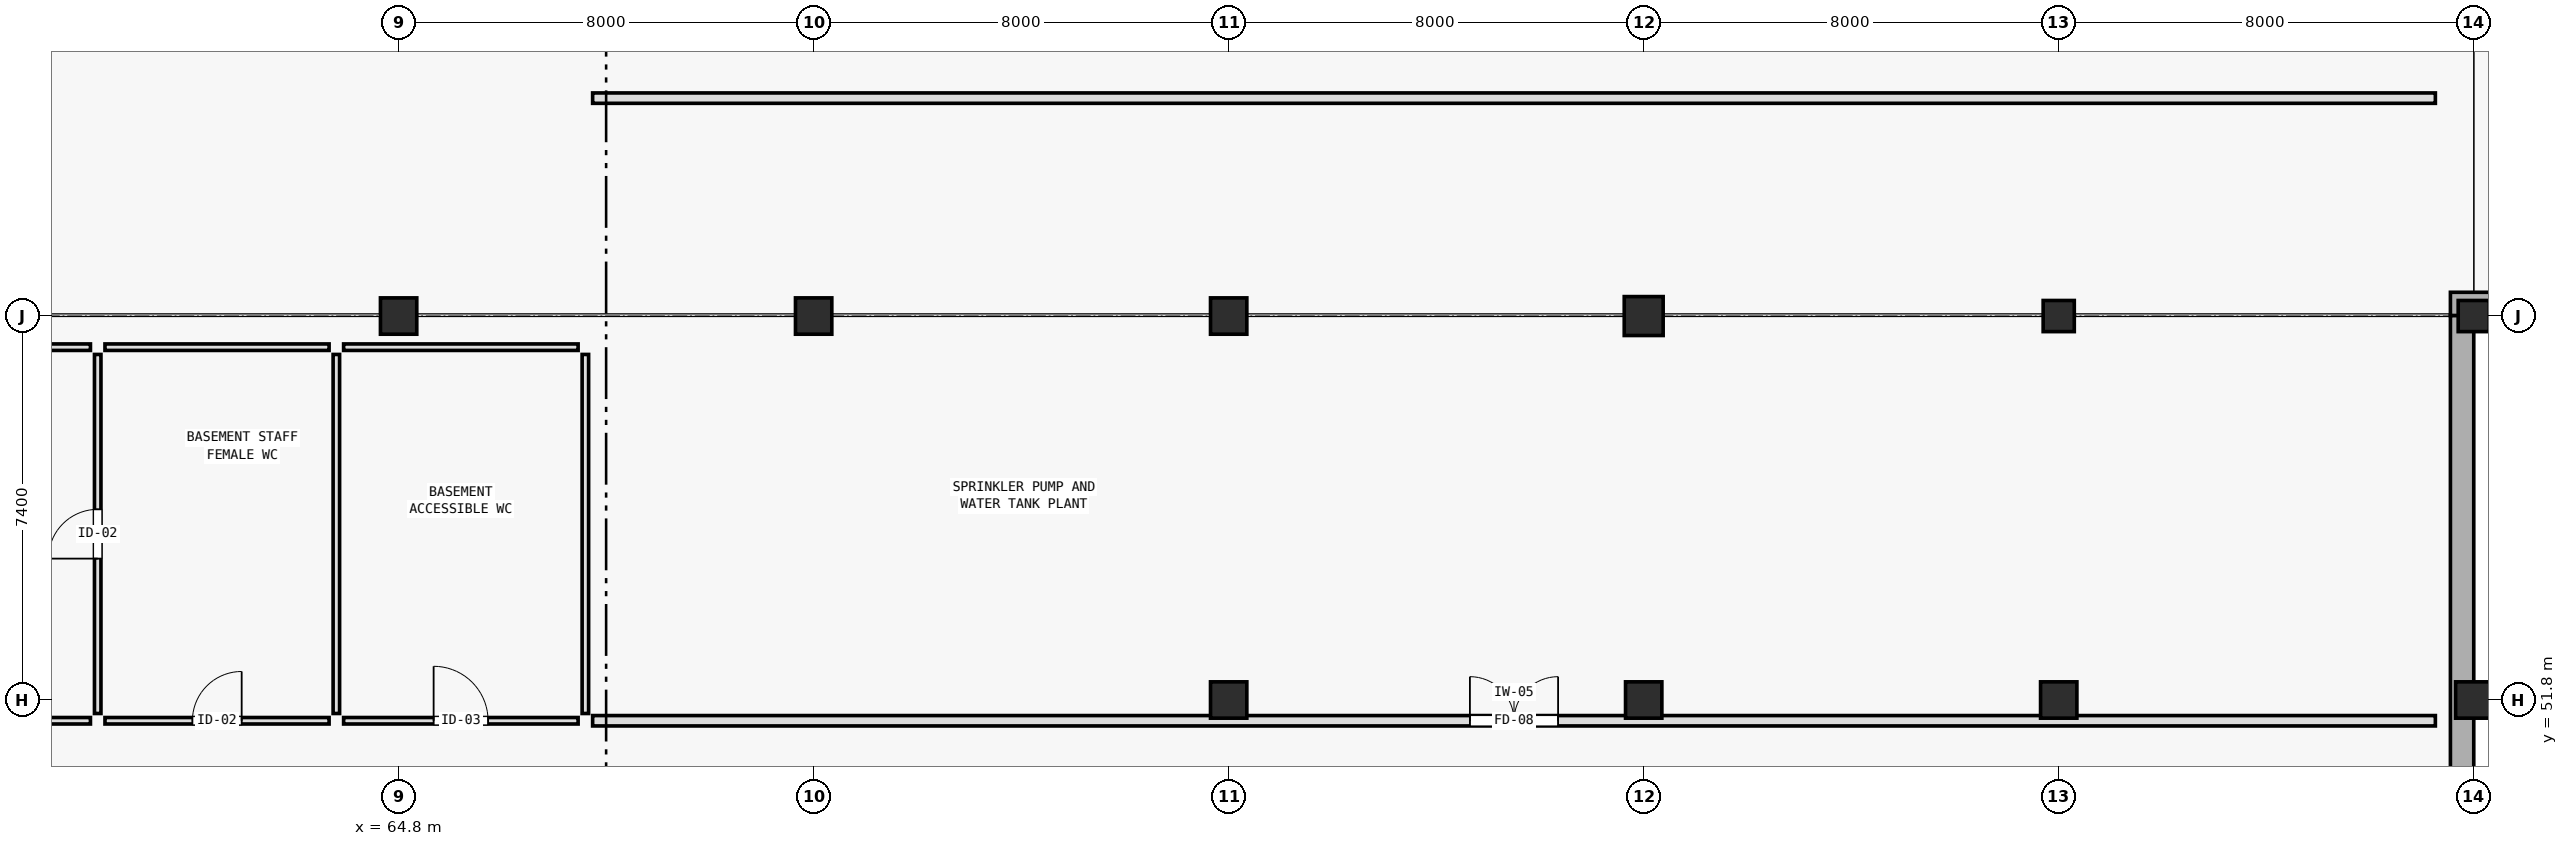
"""IFC4 building model, lengths in metres.
Left out: names, types, materials, properties, quantities, classifications, styles, units other than length and angle.
Written with IfcOpenShell. Run it as: python <this file> out.ifc"""

import sys

from ifc_helpers import new_model, si_unit, direction, frame, frame_2d, origin, origin_2d, place, context, subcontext, project, spatial, rectangle, circle, extrude, element, fill, save


model = new_model("IFC4")
c1 = context("Model", 3, precision=1e-05, world=origin(), true_north=direction((0.0, 1.0)))
c2 = subcontext(c1, "Body", "Model", "MODEL_VIEW")
j1 = project(units=[si_unit("LENGTHUNIT", "METRE"), si_unit("PLANEANGLEUNIT", "RADIAN")], contexts=[c1])
p1 = place(None, origin())
s1 = spatial("IfcSite", under=j1, at=p1, CompositionType="ELEMENT")
p2 = place(p1, origin())
s2 = spatial("IfcBuilding", under=s1, at=p2, CompositionType="ELEMENT")
p3 = place(p2, frame((0.0, 0.0, -4.8)))
s3 = spatial("IfcBuildingStorey", under=s2, at=p3, CompositionType="ELEMENT", Elevation=-4.8)
p4 = place(p3, frame((152.35, 59.433, 0.0), z_axis=(0.0, 0.0, 1.0), x_axis=(-1.0, 0.0, 0.0)))
e1 = element("IfcWall", 1, at=p4, inside=s3, PredefinedType="SOLIDWALL", context=c2, shape_type="SweptSolid", body=[
    extrude(rectangle(XDim=48.0, YDim=0.45, at=frame_2d((24.0, 0.0))), origin(), (0.0, 0.0, 1.0), 4.38),
])
p5 = place(p3, frame((104.575, 59.208, 0.0), z_axis=(0.0, 0.0, 1.0), x_axis=(0.0, -1.0, 0.0)))
e2 = element("IfcWall", 2, at=p5, inside=s3, PredefinedType="SOLIDWALL", context=c2, shape_type="SweptSolid", body=[
    extrude(rectangle(XDim=21.758, YDim=0.45, at=frame_2d((10.879, 0.0))), origin(), (0.0, 0.0, 1.0), 4.38),
])
for number, where, z_axis, x_axis in (
    (3, (64.8, 59.2, 0.0), (0.0, 0.0, 1.0), (1.0, 0.0, 0.0)),
    (4, (72.8, 59.2, 0.0), (0.0, 0.0, 1.0), (1.0, 0.0, 0.0)),
    (5, (80.8, 51.8, 0.0), (0.0, 0.0, 1.0), (1.0, 0.0, 0.0)),
    (6, (80.8, 59.2, 0.0), (0.0, 0.0, 1.0), (1.0, 0.0, 0.0)),
    (7, (88.8, 51.8, 0.0), (0.0, 0.0, 1.0), (1.0, 0.0, 0.0)),
):
    element("IfcColumn", number, at=place(p3, frame(where, z_axis=z_axis, x_axis=x_axis)), inside=s3, PredefinedType="COLUMN", context=c2, shape_type="SweptSolid", body=[
        extrude(circle(Radius=0.35, at=origin_2d()), origin(), (0.0, 0.0, 1.0), 4.8),
    ])
p6 = place(p3, frame((88.8, 59.2, 0.0), z_axis=(0.0, 0.0, 1.0), x_axis=(1.0, 0.0, 0.0)))
e8 = element("IfcColumn", 8, at=p6, inside=s3, PredefinedType="COLUMN", context=c2, shape_type="SweptSolid", body=[
    extrude(rectangle(XDim=0.75, YDim=0.75, at=origin_2d()), origin(), (0.0, 0.0, 1.0), 4.8),
])
p7 = place(p3, frame((96.8, 51.8, 0.0), z_axis=(0.0, 0.0, 1.0), x_axis=(1.0, 0.0, 0.0)))
e9 = element("IfcColumn", 9, at=p7, inside=s3, PredefinedType="COLUMN", context=c2, shape_type="SweptSolid", body=[
    extrude(circle(Radius=0.35, at=origin_2d()), origin(), (0.0, 0.0, 1.0), 4.8),
])
p8 = place(p3, frame((96.8, 59.2, 0.0), z_axis=(0.0, 0.0, 1.0), x_axis=(1.0, 0.0, 0.0)))
e10 = element("IfcColumn", 10, at=p8, inside=s3, PredefinedType="COLUMN", context=c2, shape_type="SweptSolid", body=[
    extrude(rectangle(XDim=0.6, YDim=0.6, at=origin_2d()), origin(), (0.0, 0.0, 1.0), 4.8),
])
p9 = place(p3, frame((104.8, 51.8, 0.0), z_axis=(0.0, 0.0, 1.0), x_axis=(1.0, 0.0, 0.0)))
e11 = element("IfcColumn", 11, at=p9, inside=s3, PredefinedType="COLUMN", context=c2, shape_type="SweptSolid", body=[
    extrude(circle(Radius=0.35, at=origin_2d()), origin(), (0.0, 0.0, 1.0), 4.8),
])
p10 = place(p3, frame((104.8, 59.2, 0.0), z_axis=(0.0, 0.0, 1.0), x_axis=(1.0, 0.0, 0.0)))
e12 = element("IfcColumn", 12, at=p10, inside=s3, PredefinedType="COLUMN", context=c2, shape_type="SweptSolid", body=[
    extrude(rectangle(XDim=0.6, YDim=0.6, at=origin_2d()), origin(), (0.0, 0.0, 1.0), 4.8),
])
for number, where, z_axis, x_axis in (
    (13, (54.54, 51.4, 0.0), (0.0, 0.0, 1.0), (1.0, 0.0, 0.0)),
    (14, (54.54, 58.6, 0.0), (0.0, 0.0, 1.0), (1.0, 0.0, 0.0)),
):
    element("IfcWall", number, at=place(p3, frame(where, z_axis=z_axis, x_axis=x_axis)), inside=s3, PredefinedType="PARTITIONING", context=c2, shape_type="SweptSolid", body=[
        extrude(rectangle(XDim=4.32, YDim=0.125, at=frame_2d((2.16, 0.0))), origin(), (0.0, 0.0, 1.0), 3.58),
    ])
p11 = place(p3, frame((59.0, 51.54, 0.0), z_axis=(0.0, 0.0, 1.0), x_axis=(0.0, 1.0, 0.0)))
e15 = element("IfcWall", 15, at=p11, inside=s3, PredefinedType="PARTITIONING", context=c2, shape_type="SweptSolid", body=[
    extrude(rectangle(XDim=6.92, YDim=0.125, at=frame_2d((3.46, 0.0))), origin(), (0.0, 0.0, 1.0), 4.38),
])
p12 = place(p11, frame((2.985, 0.0, 0.0)))
e16 = element("IfcOpeningElement", 16, at=p12, cuts=e15, PredefinedType="OPENING", context=c2, shape_type="SweptSolid", body=[
    extrude(rectangle(XDim=0.95, YDim=2.1, at=frame_2d((0.475, 1.05))), frame((0.0, 0.073, 0.0), z_axis=(0.0, -1.0, 0.0), x_axis=(1.0, 0.0, 0.0)), (0.0, 0.0, 1.0), 0.145),
])
p13 = place(p3, frame((59.14, 51.4, 0.0), z_axis=(0.0, 0.0, 1.0), x_axis=(1.0, 0.0, 0.0)))
e17 = element("IfcWall", 17, at=p13, inside=s3, PredefinedType="PARTITIONING", context=c2, shape_type="SweptSolid", body=[
    extrude(rectangle(XDim=4.32, YDim=0.125, at=frame_2d((2.16, 0.0))), origin(), (0.0, 0.0, 1.0), 4.38),
])
p14 = place(p13, frame((1.685, 0.0, 0.0)))
e18 = element("IfcOpeningElement", 18, at=p14, cuts=e17, PredefinedType="OPENING", context=c2, shape_type="SweptSolid", body=[
    extrude(rectangle(XDim=0.95, YDim=2.1, at=frame_2d((0.475, 1.05))), frame((0.0, 0.073, 0.0), z_axis=(0.0, -1.0, 0.0), x_axis=(1.0, 0.0, 0.0)), (0.0, 0.0, 1.0), 0.145),
])
p15 = place(p3, frame((59.14, 58.6, 0.0), z_axis=(0.0, 0.0, 1.0), x_axis=(1.0, 0.0, 0.0)))
e19 = element("IfcWall", 19, at=p15, inside=s3, PredefinedType="PARTITIONING", context=c2, shape_type="SweptSolid", body=[
    extrude(rectangle(XDim=4.32, YDim=0.125, at=frame_2d((2.16, 0.0))), origin(), (0.0, 0.0, 1.0), 4.38),
])
p16 = place(p3, frame((63.6, 51.54, 0.0), z_axis=(0.0, 0.0, 1.0), x_axis=(0.0, 1.0, 0.0)))
e20 = element("IfcWall", 20, at=p16, inside=s3, PredefinedType="PARTITIONING", context=c2, shape_type="SweptSolid", body=[
    extrude(rectangle(XDim=6.92, YDim=0.125, at=frame_2d((3.46, 0.0))), origin(), (0.0, 0.0, 1.0), 4.38),
])
p17 = place(p3, frame((63.74, 51.4, 0.0), z_axis=(0.0, 0.0, 1.0), x_axis=(1.0, 0.0, 0.0)))
e21 = element("IfcWall", 21, at=p17, inside=s3, PredefinedType="PARTITIONING", context=c2, shape_type="SweptSolid", body=[
    extrude(rectangle(XDim=4.52, YDim=0.125, at=frame_2d((2.26, 0.0))), origin(), (0.0, 0.0, 1.0), 4.38),
])
p18 = place(p17, frame((1.735, 0.0, 0.0)))
e22 = element("IfcOpeningElement", 22, at=p18, cuts=e21, PredefinedType="OPENING", context=c2, shape_type="SweptSolid", body=[
    extrude(rectangle(XDim=1.05, YDim=2.1, at=frame_2d((0.525, 1.05))), frame((0.0, 0.073, 0.0), z_axis=(0.0, -1.0, 0.0), x_axis=(1.0, 0.0, 0.0)), (0.0, 0.0, 1.0), 0.145),
])
p19 = place(p3, frame((63.74, 58.6, 0.0), z_axis=(0.0, 0.0, 1.0), x_axis=(1.0, 0.0, 0.0)))
e23 = element("IfcWall", 23, at=p19, inside=s3, PredefinedType="PARTITIONING", context=c2, shape_type="SweptSolid", body=[
    extrude(rectangle(XDim=4.52, YDim=0.125, at=frame_2d((2.26, 0.0))), origin(), (0.0, 0.0, 1.0), 4.38),
])
p20 = place(p3, frame((68.4, 51.54, 0.0), z_axis=(0.0, 0.0, 1.0), x_axis=(0.0, 1.0, 0.0)))
e24 = element("IfcWall", 24, at=p20, inside=s3, PredefinedType="PARTITIONING", context=c2, shape_type="SweptSolid", body=[
    extrude(rectangle(XDim=6.92, YDim=0.125, at=frame_2d((3.46, 0.0))), origin(), (0.0, 0.0, 1.0), 4.38),
])
p21 = place(p3, frame((68.54, 51.4, 0.0), z_axis=(0.0, 0.0, 1.0), x_axis=(1.0, 0.0, 0.0)))
e25 = element("IfcWall", 25, at=p21, inside=s3, PredefinedType="STANDARD", context=c2, shape_type="SweptSolid", body=[
    extrude(rectangle(XDim=35.52, YDim=0.2, at=frame_2d((17.76, 0.0))), origin(), (0.0, 0.0, 1.0), 3.58),
])
p22 = place(p21, frame((16.91, 0.0, 0.0)))
e26 = element("IfcOpeningElement", 26, at=p22, cuts=e25, PredefinedType="OPENING", context=c2, shape_type="SweptSolid", body=[
    extrude(rectangle(XDim=1.7, YDim=2.4, at=frame_2d((0.85, 1.2))), frame((0.0, 0.11, 0.0), z_axis=(0.0, -1.0, 0.0), x_axis=(1.0, 0.0, 0.0)), (0.0, 0.0, 1.0), 0.22),
])
p23 = place(p3, frame((68.54, 63.4, 0.0), z_axis=(0.0, 0.0, 1.0), x_axis=(1.0, 0.0, 0.0)))
e27 = element("IfcWall", 27, at=p23, inside=s3, PredefinedType="STANDARD", context=c2, shape_type="SweptSolid", body=[
    extrude(rectangle(XDim=35.52, YDim=0.2, at=frame_2d((17.76, 0.0))), origin(), (0.0, 0.0, 1.0), 3.58),
])
p24 = place(p12, origin())
e28 = element("IfcDoor", 28, at=p24, inside=s3, OperationType="SINGLE_SWING_LEFT", PredefinedType="DOOR", context=c2, shape_type="SweptSolid", body=[
    extrude(rectangle(XDim=0.95, YDim=2.1, at=frame_2d((0.475, 1.05))), frame((0.0, 0.025, 0.0), z_axis=(0.0, -1.0, 0.0), x_axis=(1.0, 0.0, 0.0)), (0.0, 0.0, 1.0), 0.05),
])
fill(e16, e28)
p25 = place(p14, origin())
e29 = element("IfcDoor", 29, at=p25, inside=s3, OperationType="SINGLE_SWING_RIGHT", PredefinedType="DOOR", context=c2, shape_type="SweptSolid", body=[
    extrude(rectangle(XDim=0.95, YDim=2.1, at=frame_2d((0.475, 1.05))), frame((0.0, 0.025, 0.0), z_axis=(0.0, -1.0, 0.0), x_axis=(1.0, 0.0, 0.0)), (0.0, 0.0, 1.0), 0.05),
])
fill(e18, e29)
p26 = place(p18, origin())
e30 = element("IfcDoor", 30, at=p26, inside=s3, OperationType="SINGLE_SWING_LEFT", PredefinedType="DOOR", context=c2, shape_type="SweptSolid", body=[
    extrude(rectangle(XDim=1.05, YDim=2.1, at=frame_2d((0.525, 1.05))), frame((0.0, 0.025, 0.0), z_axis=(0.0, -1.0, 0.0), x_axis=(1.0, 0.0, 0.0)), (0.0, 0.0, 1.0), 0.05),
])
fill(e22, e30)
p27 = place(p22, origin())
e31 = element("IfcDoor", 31, at=p27, inside=s3, OperationType="DOUBLE_DOOR_SINGLE_SWING", PredefinedType="DOOR", context=c2, shape_type="SweptSolid", body=[
    extrude(rectangle(XDim=1.7, YDim=2.4, at=frame_2d((0.85, 1.2))), frame((0.0, 0.025, 0.0), z_axis=(0.0, -1.0, 0.0), x_axis=(1.0, 0.0, 0.0)), (0.0, 0.0, 1.0), 0.05),
])
fill(e26, e31)
save(model, sys.argv[1])
